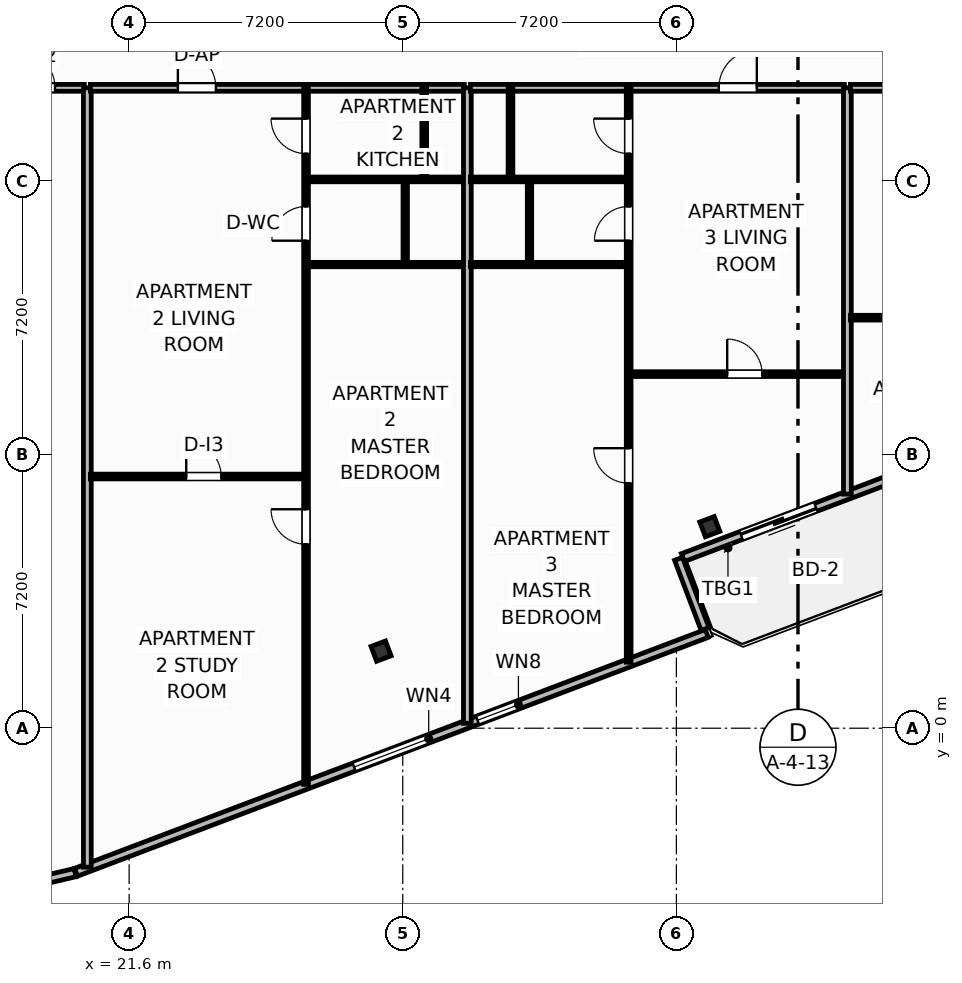
"""IFC4 building model, lengths in metres.
Left out: names, types, materials, properties, quantities, classifications, styles, units other than length and angle.
Written with IfcOpenShell. Run it as: python <this file> out.ifc"""

import sys

from ifc_helpers import new_model, si_unit, direction, frame, frame_2d, origin, origin_2d, place, context, subcontext, project, spatial, rectangle, i_section, extrude, element, fill, save


model = new_model("IFC4")
c1 = context("Model", 3, precision=1e-05, world=origin(), true_north=direction((0.0, 1.0)))
c2 = subcontext(c1, "Body", "Model", "MODEL_VIEW")
j1 = project(units=[si_unit("LENGTHUNIT", "METRE"), si_unit("PLANEANGLEUNIT", "RADIAN")], contexts=[c1])
p1 = place(None, origin())
s1 = spatial("IfcSite", under=j1, at=p1, CompositionType="ELEMENT")
p2 = place(p1, origin())
s2 = spatial("IfcBuilding", under=s1, at=p2, CompositionType="ELEMENT")
p3 = place(p2, frame((0.0, 0.0, 220.1)))
s3 = spatial("IfcBuildingStorey", under=s2, at=p3, CompositionType="ELEMENT", Elevation=220.1)
for number, where, z_axis, x_axis in (
    (1, (28.229, 2.028, 0.0), (0.0, 0.0, 1.0), (0.935, 0.354, 0.0)),
    (2, (36.88, 5.303, 0.0), (0.0, 0.0, 1.0), (0.935, 0.354, 0.0)),
):
    element("IfcColumn", number, at=place(p3, frame(where, z_axis=z_axis, x_axis=x_axis)), inside=s3, PredefinedType="COLUMN", context=c2, shape_type="SweptSolid", body=[
        extrude(i_section(OverallWidth=0.406, OverallDepth=0.416, WebThickness=0.03, FlangeThickness=0.048, FilletRadius=0.025, at=origin_2d()), origin(), (0.0, 0.0, 1.0), 3.7),
    ])
p4 = place(p3, frame((41.783, 6.614, 0.0), z_axis=(0.0, 0.0, 1.0), x_axis=(-0.93521416643, -0.354082565101, 0.0)))
e3 = element("IfcWall", 3, at=p4, inside=s3, PredefinedType="SOLIDWALL", context=c2, shape_type="SweptSolid", body=[
    extrude(rectangle(XDim=6.0, YDim=0.22, at=frame_2d((3.0, 0.0))), origin(), (0.0, 0.0, 1.0), 2.73),
])
p5 = place(p4, frame((2.26, 0.0, 0.0)))
e4 = element("IfcOpeningElement", 4, at=p5, cuts=e3, PredefinedType="OPENING", context=c2, shape_type="SweptSolid", body=[
    extrude(rectangle(XDim=2.1, YDim=2.3, at=frame_2d((1.05, 1.15))), frame((0.0, 0.12, 0.0), z_axis=(0.0, -1.0, 0.0), x_axis=(1.0, 0.0, 0.0)), (0.0, 0.0, 1.0), 0.24),
])
p6 = place(p3, frame((18.956, -4.087, 0.0), z_axis=(0.0, 0.0, 1.0), x_axis=(0.973463008152, 0.228844426981, 0.0)))
e5 = element("IfcWall", 5, at=p6, inside=s3, PredefinedType="SOLIDWALL", context=c2, shape_type="SweptSolid", body=[
    extrude(rectangle(XDim=1.257, YDim=0.22, at=frame_2d((0.628, 0.0))), origin(), (0.0, 0.0, 1.0), 2.73),
])
p7 = place(p3, frame((20.202, -3.791, 0.0), z_axis=(0.0, 0.0, 1.0), x_axis=(0.935225574232, 0.354052432984, 0.0)))
e6 = element("IfcWall", 6, at=p7, inside=s3, PredefinedType="SOLIDWALL", context=c2, shape_type="SweptSolid", body=[
    extrude(rectangle(XDim=17.747, YDim=0.22, at=frame_2d((8.874, 0.0))), origin(), (0.0, 0.0, 1.0), 2.73),
])
p8 = place(p7, frame((7.823, 0.0, 0.8)))
e7 = element("IfcOpeningElement", 7, at=p8, cuts=e6, PredefinedType="OPENING", context=c2, shape_type="SweptSolid", body=[
    extrude(rectangle(XDim=2.1, YDim=1.75, at=frame_2d((1.05, 0.875))), frame((0.0, 0.12, 0.0), z_axis=(0.0, -1.0, 0.0), x_axis=(1.0, 0.0, 0.0)), (0.0, 0.0, 1.0), 0.24),
])
p9 = place(p7, frame((11.298, 0.0, 0.8)))
e8 = element("IfcOpeningElement", 8, at=p9, cuts=e6, PredefinedType="OPENING", context=c2, shape_type="SweptSolid", body=[
    extrude(rectangle(XDim=1.15, YDim=1.4, at=frame_2d((0.575, 0.7))), frame((0.0, 0.12, 0.0), z_axis=(0.0, -1.0, 0.0), x_axis=(1.0, 0.0, 0.0)), (0.0, 0.0, 1.0), 0.24),
])
p10 = place(p3, frame((36.755, 2.61, 0.0), z_axis=(0.0, 0.0, 1.0), x_axis=(-0.354020680661, 0.935237594232, 0.0)))
e9 = element("IfcWall", 9, at=p10, inside=s3, PredefinedType="SOLIDWALL", context=c2, shape_type="SweptSolid", body=[
    extrude(rectangle(XDim=1.975, YDim=0.22, at=frame_2d((0.988, 0.0))), origin(), (0.0, 0.0, 1.0), 2.73),
])
p11 = place(p3, frame((7.196, 16.85, 0.0), z_axis=(0.0, 0.0, 1.0), x_axis=(1.0, 0.0, 0.0)))
e10 = element("IfcWall", 10, at=p11, inside=s3, PredefinedType="PARTITIONING", context=c2, shape_type="SweptSolid", body=[
    extrude(rectangle(XDim=13.224, YDim=0.18, at=frame_2d((6.612, 0.0))), origin(), (0.0, 0.0, 1.0), 3.45),
])
p12 = place(p11, frame((11.504, 0.0, 0.0)))
e11 = element("IfcOpeningElement", 11, at=p12, cuts=e10, PredefinedType="OPENING", context=c2, shape_type="SweptSolid", body=[
    extrude(rectangle(XDim=0.95, YDim=2.05, at=frame_2d((0.475, 1.025))), frame((0.0, 0.1, 0.0), z_axis=(0.0, -1.0, 0.0), x_axis=(1.0, 0.0, 0.0)), (0.0, 0.0, 1.0), 0.2),
])
p13 = place(p3, frame((20.5, -3.657, 0.0), z_axis=(0.0, 0.0, 1.0), x_axis=(0.0, 1.0, 0.0)))
e12 = element("IfcWall", 12, at=p13, inside=s3, PredefinedType="PARTITIONING", context=c2, shape_type="SweptSolid", body=[
    extrude(rectangle(XDim=20.507, YDim=0.205, at=frame_2d((10.253, 0.0))), origin(), (0.0, 0.0, 1.0), 3.45),
])
p14 = place(p3, frame((20.58, 6.623, 0.0), z_axis=(0.0, 0.0, 1.0), x_axis=(1.0, 0.0, 0.0)))
e13 = element("IfcWall", 13, at=p14, inside=s3, PredefinedType="PARTITIONING", context=c2, shape_type="SweptSolid", body=[
    extrude(rectangle(XDim=5.605, YDim=0.125, at=frame_2d((2.803, 0.0))), origin(), (0.0, 0.0, 1.0), 3.45),
])
p15 = place(p14, frame((2.522, 0.0, 0.0)))
e14 = element("IfcOpeningElement", 14, at=p15, cuts=e13, PredefinedType="OPENING", context=c2, shape_type="SweptSolid", body=[
    extrude(rectangle(XDim=0.92, YDim=2.05, at=frame_2d((0.46, 1.025))), frame((0.0, 0.073, 0.0), z_axis=(0.0, -1.0, 0.0), x_axis=(1.0, 0.0, 0.0)), (0.0, 0.0, 1.0), 0.145),
])
p16 = place(p3, frame((20.58, 16.85, 0.0), z_axis=(0.0, 0.0, 1.0), x_axis=(1.0, 0.0, 0.0)))
e15 = element("IfcWall", 15, at=p16, inside=s3, PredefinedType="PARTITIONING", context=c2, shape_type="SweptSolid", body=[
    extrude(rectangle(XDim=9.84, YDim=0.18, at=frame_2d((4.92, 0.0))), origin(), (0.0, 0.0, 1.0), 3.45),
])
p17 = place(p16, frame((2.302, 0.0, 0.0)))
e16 = element("IfcOpeningElement", 16, at=p17, cuts=e15, PredefinedType="OPENING", context=c2, shape_type="SweptSolid", body=[
    extrude(rectangle(XDim=1.0, YDim=2.2, at=frame_2d((0.5, 1.1))), frame((0.0, 0.1, 0.0), z_axis=(0.0, -1.0, 0.0), x_axis=(1.0, 0.0, 0.0)), (0.0, 0.0, 1.0), 0.2),
])
p18 = place(p3, frame((26.255, -1.478, 0.0), z_axis=(0.0, 0.0, 1.0), x_axis=(0.0, 1.0, 0.0)))
e17 = element("IfcWall", 17, at=p18, inside=s3, PredefinedType="PARTITIONING", context=c2, shape_type="SweptSolid", body=[
    extrude(rectangle(XDim=18.328, YDim=0.125, at=frame_2d((9.164, 0.0))), origin(), (0.0, 0.0, 1.0), 2.739),
])
p19 = place(p18, frame((6.319, 0.0, 0.0)))
e18 = element("IfcOpeningElement", 18, at=p19, cuts=e17, PredefinedType="OPENING", context=c2, shape_type="SweptSolid", body=[
    extrude(rectangle(XDim=0.92, YDim=2.05, at=frame_2d((0.46, 1.025))), frame((0.0, 0.073, 0.0), z_axis=(0.0, -1.0, 0.0), x_axis=(1.0, 0.0, 0.0)), (0.0, 0.0, 1.0), 0.145),
])
p20 = place(p18, frame((14.305, 0.0, 0.0)))
e19 = element("IfcOpeningElement", 19, at=p20, cuts=e17, PredefinedType="OPENING", context=c2, shape_type="SweptSolid", body=[
    extrude(rectangle(XDim=0.9, YDim=2.05, at=frame_2d((0.45, 1.025))), frame((0.0, 0.073, 0.0), z_axis=(0.0, -1.0, 0.0), x_axis=(1.0, 0.0, 0.0)), (0.0, 0.0, 1.0), 0.145),
])
p21 = place(p18, frame((16.598, 0.0, 0.0)))
e20 = element("IfcOpeningElement", 20, at=p21, cuts=e17, PredefinedType="OPENING", context=c2, shape_type="SweptSolid", body=[
    extrude(rectangle(XDim=0.92, YDim=2.05, at=frame_2d((0.46, 1.025))), frame((0.0, 0.073, 0.0), z_axis=(0.0, -1.0, 0.0), x_axis=(1.0, 0.0, 0.0)), (0.0, 0.0, 1.0), 0.145),
])
p22 = place(p3, frame((26.325, 14.44, 0.0), z_axis=(0.0, 0.0, 1.0), x_axis=(1.0, 0.0, 0.0)))
e21 = element("IfcWall", 21, at=p22, inside=s3, PredefinedType="PARTITIONING", context=c2, shape_type="SweptSolid", body=[
    extrude(rectangle(XDim=4.095, YDim=0.125, at=frame_2d((2.047, 0.0))), origin(), (0.0, 0.0, 1.0), 3.45),
])
p23 = place(p3, frame((26.325, 12.2, 0.0), z_axis=(0.0, 0.0, 1.0), x_axis=(1.0, 0.0, 0.0)))
e22 = element("IfcWall", 22, at=p23, inside=s3, PredefinedType="PARTITIONING", context=c2, shape_type="SweptSolid", body=[
    extrude(rectangle(XDim=4.095, YDim=0.115, at=frame_2d((2.047, 0.0))), origin(), (0.0, 0.0, 1.0), 3.45),
])
p24 = place(p3, frame((29.365, 14.44, 0.0), z_axis=(0.0, 0.0, 1.0), x_axis=(0.0, 1.0, 0.0)))
e23 = element("IfcWall", 23, at=p24, inside=s3, PredefinedType="PARTITIONING", context=c2, shape_type="SweptSolid", body=[
    extrude(rectangle(XDim=2.41, YDim=0.125, at=frame_2d((1.205, 0.0))), origin(), (0.0, 0.0, 1.0), 3.45),
])
p25 = place(p3, frame((28.865, 12.2, 0.0), z_axis=(0.0, 0.0, 1.0), x_axis=(0.0, 1.0, 0.0)))
e24 = element("IfcWall", 24, at=p25, inside=s3, PredefinedType="PARTITIONING", context=c2, shape_type="SweptSolid", body=[
    extrude(rectangle(XDim=2.24, YDim=0.115, at=frame_2d((1.12, 0.0))), origin(), (0.0, 0.0, 1.0), 3.45),
])
p26 = place(p3, frame((30.5, 0.129, 0.0), z_axis=(0.0, 0.0, 1.0), x_axis=(0.0, 1.0, 0.0)))
e25 = element("IfcWall", 25, at=p26, inside=s3, PredefinedType="PARTITIONING", context=c2, shape_type="SweptSolid", body=[
    extrude(rectangle(XDim=16.721, YDim=0.205, at=frame_2d((8.36, 0.0))), origin(), (0.0, 0.0, 1.0), 3.45),
])
p27 = place(p3, frame((34.815, 9.317, 0.0), z_axis=(0.0, 0.0, 1.0), x_axis=(1.0, 0.0, 0.0)))
e26 = element("IfcWall", 26, at=p27, inside=s3, PredefinedType="PARTITIONING", context=c2, shape_type="SweptSolid", body=[
    extrude(rectangle(XDim=5.605, YDim=0.125, at=frame_2d((2.803, 0.0))), origin(), (0.0, 0.0, 1.0), 3.45),
])
p28 = place(p27, frame((2.522, 0.0, 0.0)))
e27 = element("IfcOpeningElement", 27, at=p28, cuts=e26, PredefinedType="OPENING", context=c2, shape_type="SweptSolid", body=[
    extrude(rectangle(XDim=0.92, YDim=2.05, at=frame_2d((0.46, 1.025))), frame((0.0, 0.073, 0.0), z_axis=(0.0, -1.0, 0.0), x_axis=(1.0, 0.0, 0.0)), (0.0, 0.0, 1.0), 0.145),
])
p29 = place(p3, frame((30.58, 16.85, 0.0), z_axis=(0.0, 0.0, 1.0), x_axis=(1.0, 0.0, 0.0)))
e28 = element("IfcWall", 28, at=p29, inside=s3, PredefinedType="PARTITIONING", context=c2, shape_type="SweptSolid", body=[
    extrude(rectangle(XDim=9.84, YDim=0.18, at=frame_2d((4.92, 0.0))), origin(), (0.0, 0.0, 1.0), 3.45),
])
p30 = place(p29, frame((6.537, 0.0, 0.0)))
e29 = element("IfcOpeningElement", 29, at=p30, cuts=e28, PredefinedType="OPENING", context=c2, shape_type="SweptSolid", body=[
    extrude(rectangle(XDim=1.0, YDim=2.2, at=frame_2d((0.5, 1.1))), frame((0.0, 0.1, 0.0), z_axis=(0.0, -1.0, 0.0), x_axis=(1.0, 0.0, 0.0)), (0.0, 0.0, 1.0), 0.2),
])
p31 = place(p3, frame((34.745, 1.736, 0.0), z_axis=(0.0, 0.0, 1.0), x_axis=(0.0, 1.0, 0.0)))
e30 = element("IfcWall", 30, at=p31, inside=s3, PredefinedType="PARTITIONING", context=c2, shape_type="SweptSolid", body=[
    extrude(rectangle(XDim=15.114, YDim=0.125, at=frame_2d((7.557, 0.0))), origin(), (0.0, 0.0, 1.0), 2.739),
])
p32 = place(p31, frame((4.712, 0.0, 0.0)))
e31 = element("IfcOpeningElement", 31, at=p32, cuts=e30, PredefinedType="OPENING", context=c2, shape_type="SweptSolid", body=[
    extrude(rectangle(XDim=0.92, YDim=2.05, at=frame_2d((0.46, 1.025))), frame((0.0, 0.073, 0.0), z_axis=(0.0, -1.0, 0.0), x_axis=(1.0, 0.0, 0.0)), (0.0, 0.0, 1.0), 0.145),
])
p33 = place(p31, frame((11.091, 0.0, 0.0)))
e32 = element("IfcOpeningElement", 32, at=p33, cuts=e30, PredefinedType="OPENING", context=c2, shape_type="SweptSolid", body=[
    extrude(rectangle(XDim=0.9, YDim=2.05, at=frame_2d((0.45, 1.025))), frame((0.0, 0.073, 0.0), z_axis=(0.0, -1.0, 0.0), x_axis=(1.0, 0.0, 0.0)), (0.0, 0.0, 1.0), 0.145),
])
p34 = place(p31, frame((13.384, 0.0, 0.0)))
e33 = element("IfcOpeningElement", 33, at=p34, cuts=e30, PredefinedType="OPENING", context=c2, shape_type="SweptSolid", body=[
    extrude(rectangle(XDim=0.92, YDim=2.05, at=frame_2d((0.46, 1.025))), frame((0.0, 0.073, 0.0), z_axis=(0.0, -1.0, 0.0), x_axis=(1.0, 0.0, 0.0)), (0.0, 0.0, 1.0), 0.145),
])
p35 = place(p3, frame((30.58, 14.44, 0.0), z_axis=(0.0, 0.0, 1.0), x_axis=(1.0, 0.0, 0.0)))
e34 = element("IfcWall", 34, at=p35, inside=s3, PredefinedType="PARTITIONING", context=c2, shape_type="SweptSolid", body=[
    extrude(rectangle(XDim=4.095, YDim=0.125, at=frame_2d((2.047, 0.0))), origin(), (0.0, 0.0, 1.0), 3.45),
])
p36 = place(p3, frame((30.58, 12.2, 0.0), z_axis=(0.0, 0.0, 1.0), x_axis=(1.0, 0.0, 0.0)))
e35 = element("IfcWall", 35, at=p36, inside=s3, PredefinedType="PARTITIONING", context=c2, shape_type="SweptSolid", body=[
    extrude(rectangle(XDim=4.095, YDim=0.115, at=frame_2d((2.047, 0.0))), origin(), (0.0, 0.0, 1.0), 3.45),
])
p37 = place(p3, frame((31.635, 14.44, 0.0), z_axis=(0.0, 0.0, 1.0), x_axis=(0.0, 1.0, 0.0)))
e36 = element("IfcWall", 36, at=p37, inside=s3, PredefinedType="PARTITIONING", context=c2, shape_type="SweptSolid", body=[
    extrude(rectangle(XDim=2.41, YDim=0.125, at=frame_2d((1.205, 0.0))), origin(), (0.0, 0.0, 1.0), 3.45),
])
p38 = place(p3, frame((32.135, 12.2, 0.0), z_axis=(0.0, 0.0, 1.0), x_axis=(0.0, 1.0, 0.0)))
e37 = element("IfcWall", 37, at=p38, inside=s3, PredefinedType="PARTITIONING", context=c2, shape_type="SweptSolid", body=[
    extrude(rectangle(XDim=2.24, YDim=0.115, at=frame_2d((1.12, 0.0))), origin(), (0.0, 0.0, 1.0), 3.45),
])
p39 = place(p3, frame((40.5, 6.16, 0.0), z_axis=(0.0, 0.0, 1.0), x_axis=(0.0, 1.0, 0.0)))
e38 = element("IfcWall", 38, at=p39, inside=s3, PredefinedType="PARTITIONING", context=c2, shape_type="SweptSolid", body=[
    extrude(rectangle(XDim=10.69, YDim=0.205, at=frame_2d((5.345, 0.0))), origin(), (0.0, 0.0, 1.0), 3.45),
])
p40 = place(p3, frame((40.58, 10.802, 0.0), z_axis=(0.0, 0.0, 1.0), x_axis=(1.0, 0.0, 0.0)))
e39 = element("IfcWall", 39, at=p40, inside=s3, PredefinedType="PARTITIONING", context=c2, shape_type="SweptSolid", body=[
    extrude(rectangle(XDim=5.605, YDim=0.125, at=frame_2d((2.803, 0.0))), origin(), (0.0, 0.0, 1.0), 3.45),
])
p41 = place(p40, frame((2.522, 0.0, 0.0)))
e40 = element("IfcOpeningElement", 40, at=p41, cuts=e39, PredefinedType="OPENING", context=c2, shape_type="SweptSolid", body=[
    extrude(rectangle(XDim=0.92, YDim=2.05, at=frame_2d((0.46, 1.025))), frame((0.0, 0.073, 0.0), z_axis=(0.0, -1.0, 0.0), x_axis=(1.0, 0.0, 0.0)), (0.0, 0.0, 1.0), 0.145),
])
p42 = place(p3, frame((40.58, 16.85, 0.0), z_axis=(0.0, 0.0, 1.0), x_axis=(1.0, 0.0, 0.0)))
e41 = element("IfcWall", 41, at=p42, inside=s3, PredefinedType="PARTITIONING", context=c2, shape_type="SweptSolid", body=[
    extrude(rectangle(XDim=9.84, YDim=0.18, at=frame_2d((4.92, 0.0))), origin(), (0.0, 0.0, 1.0), 3.45),
])
p43 = place(p42, frame((2.302, 0.0, 0.0)))
e42 = element("IfcOpeningElement", 42, at=p43, cuts=e41, PredefinedType="OPENING", context=c2, shape_type="SweptSolid", body=[
    extrude(rectangle(XDim=1.0, YDim=2.2, at=frame_2d((0.5, 1.1))), frame((0.0, 0.1, 0.0), z_axis=(0.0, -1.0, 0.0), x_axis=(1.0, 0.0, 0.0)), (0.0, 0.0, 1.0), 0.2),
])
p44 = place(p5, origin())
e43 = element("IfcDoor", 43, at=p44, inside=s3, OperationType="SLIDING_TO_LEFT", PredefinedType="DOOR", context=c2, shape_type="SweptSolid", body=[
    extrude(rectangle(XDim=2.1, YDim=2.3, at=frame_2d((1.05, 1.15))), frame((0.0, 0.025, 0.0), z_axis=(0.0, -1.0, 0.0), x_axis=(1.0, 0.0, 0.0)), (0.0, 0.0, 1.0), 0.05),
])
fill(e4, e43)
p45 = place(p8, origin())
e44 = element("IfcWindow", 44, at=p45, inside=s3, PartitioningType="SINGLE_PANEL", PredefinedType="WINDOW", context=c2, shape_type="SweptSolid", body=[
    extrude(rectangle(XDim=2.1, YDim=1.75, at=frame_2d((1.05, 0.875))), frame((0.0, 0.03, 0.0), z_axis=(0.0, -1.0, 0.0), x_axis=(1.0, 0.0, 0.0)), (0.0, 0.0, 1.0), 0.06),
])
fill(e7, e44)
p46 = place(p12, origin())
e45 = element("IfcDoor", 45, at=p46, inside=s3, OperationType="SINGLE_SWING_LEFT", PredefinedType="DOOR", context=c2, shape_type="SweptSolid", body=[
    extrude(rectangle(XDim=0.95, YDim=2.05, at=frame_2d((0.475, 1.025))), frame((0.0, 0.025, 0.0), z_axis=(0.0, -1.0, 0.0), x_axis=(1.0, 0.0, 0.0)), (0.0, 0.0, 1.0), 0.05),
])
fill(e11, e45)
p47 = place(p15, origin())
e46 = element("IfcDoor", 46, at=p47, inside=s3, OperationType="SINGLE_SWING_LEFT", PredefinedType="DOOR", context=c2, shape_type="SweptSolid", body=[
    extrude(rectangle(XDim=0.92, YDim=2.05, at=frame_2d((0.46, 1.025))), frame((0.0, 0.025, 0.0), z_axis=(0.0, -1.0, 0.0), x_axis=(1.0, 0.0, 0.0)), (0.0, 0.0, 1.0), 0.05),
])
fill(e14, e46)
p48 = place(p17, origin())
e47 = element("IfcDoor", 47, at=p48, inside=s3, OperationType="SINGLE_SWING_LEFT", PredefinedType="DOOR", context=c2, shape_type="SweptSolid", body=[
    extrude(rectangle(XDim=1.0, YDim=2.2, at=frame_2d((0.5, 1.1))), frame((0.0, 0.025, 0.0), z_axis=(0.0, -1.0, 0.0), x_axis=(1.0, 0.0, 0.0)), (0.0, 0.0, 1.0), 0.05),
])
fill(e16, e47)
p49 = place(p19, origin())
e48 = element("IfcDoor", 48, at=p49, inside=s3, OperationType="SINGLE_SWING_RIGHT", PredefinedType="DOOR", context=c2, shape_type="SweptSolid", body=[
    extrude(rectangle(XDim=0.92, YDim=2.05, at=frame_2d((0.46, 1.025))), frame((0.0, 0.025, 0.0), z_axis=(0.0, -1.0, 0.0), x_axis=(1.0, 0.0, 0.0)), (0.0, 0.0, 1.0), 0.05),
])
fill(e18, e48)
p50 = place(p20, origin())
e49 = element("IfcDoor", 49, at=p50, inside=s3, OperationType="SINGLE_SWING_LEFT", PredefinedType="DOOR", context=c2, shape_type="SweptSolid", body=[
    extrude(rectangle(XDim=0.9, YDim=2.05, at=frame_2d((0.45, 1.025))), frame((0.0, 0.025, 0.0), z_axis=(0.0, -1.0, 0.0), x_axis=(1.0, 0.0, 0.0)), (0.0, 0.0, 1.0), 0.05),
])
fill(e19, e49)
p51 = place(p21, origin())
e50 = element("IfcDoor", 50, at=p51, inside=s3, OperationType="SINGLE_SWING_RIGHT", PredefinedType="DOOR", context=c2, shape_type="SweptSolid", body=[
    extrude(rectangle(XDim=0.92, YDim=2.05, at=frame_2d((0.46, 1.025))), frame((0.0, 0.025, 0.0), z_axis=(0.0, -1.0, 0.0), x_axis=(1.0, 0.0, 0.0)), (0.0, 0.0, 1.0), 0.05),
])
fill(e20, e50)
p52 = place(p28, origin())
e51 = element("IfcDoor", 51, at=p52, inside=s3, OperationType="SINGLE_SWING_LEFT", PredefinedType="DOOR", context=c2, shape_type="SweptSolid", body=[
    extrude(rectangle(XDim=0.92, YDim=2.05, at=frame_2d((0.46, 1.025))), frame((0.0, 0.025, 0.0), z_axis=(0.0, -1.0, 0.0), x_axis=(1.0, 0.0, 0.0)), (0.0, 0.0, 1.0), 0.05),
])
fill(e27, e51)
p53 = place(p30, origin())
e52 = element("IfcDoor", 52, at=p53, inside=s3, OperationType="SINGLE_SWING_RIGHT", PredefinedType="DOOR", context=c2, shape_type="SweptSolid", body=[
    extrude(rectangle(XDim=1.0, YDim=2.2, at=frame_2d((0.5, 1.1))), frame((0.0, 0.025, 0.0), z_axis=(0.0, -1.0, 0.0), x_axis=(1.0, 0.0, 0.0)), (0.0, 0.0, 1.0), 0.05),
])
fill(e29, e52)
p54 = place(p32, origin())
e53 = element("IfcDoor", 53, at=p54, inside=s3, OperationType="SINGLE_SWING_RIGHT", PredefinedType="DOOR", context=c2, shape_type="SweptSolid", body=[
    extrude(rectangle(XDim=0.92, YDim=2.05, at=frame_2d((0.46, 1.025))), frame((0.0, 0.025, 0.0), z_axis=(0.0, -1.0, 0.0), x_axis=(1.0, 0.0, 0.0)), (0.0, 0.0, 1.0), 0.05),
])
fill(e31, e53)
p55 = place(p33, origin())
e54 = element("IfcDoor", 54, at=p55, inside=s3, OperationType="SINGLE_SWING_LEFT", PredefinedType="DOOR", context=c2, shape_type="SweptSolid", body=[
    extrude(rectangle(XDim=0.9, YDim=2.05, at=frame_2d((0.45, 1.025))), frame((0.0, 0.025, 0.0), z_axis=(0.0, -1.0, 0.0), x_axis=(1.0, 0.0, 0.0)), (0.0, 0.0, 1.0), 0.05),
])
fill(e32, e54)
p56 = place(p34, origin())
e55 = element("IfcDoor", 55, at=p56, inside=s3, OperationType="SINGLE_SWING_RIGHT", PredefinedType="DOOR", context=c2, shape_type="SweptSolid", body=[
    extrude(rectangle(XDim=0.92, YDim=2.05, at=frame_2d((0.46, 1.025))), frame((0.0, 0.025, 0.0), z_axis=(0.0, -1.0, 0.0), x_axis=(1.0, 0.0, 0.0)), (0.0, 0.0, 1.0), 0.05),
])
fill(e33, e55)
p57 = place(p9, origin())
e56 = element("IfcWindow", 56, at=p57, inside=s3, PartitioningType="SINGLE_PANEL", PredefinedType="WINDOW", context=c2, shape_type="SweptSolid", body=[
    extrude(rectangle(XDim=1.15, YDim=1.4, at=frame_2d((0.575, 0.7))), frame((0.0, 0.03, 0.0), z_axis=(0.0, -1.0, 0.0), x_axis=(1.0, 0.0, 0.0)), (0.0, 0.0, 1.0), 0.06),
])
fill(e8, e56)
save(model, sys.argv[1])
